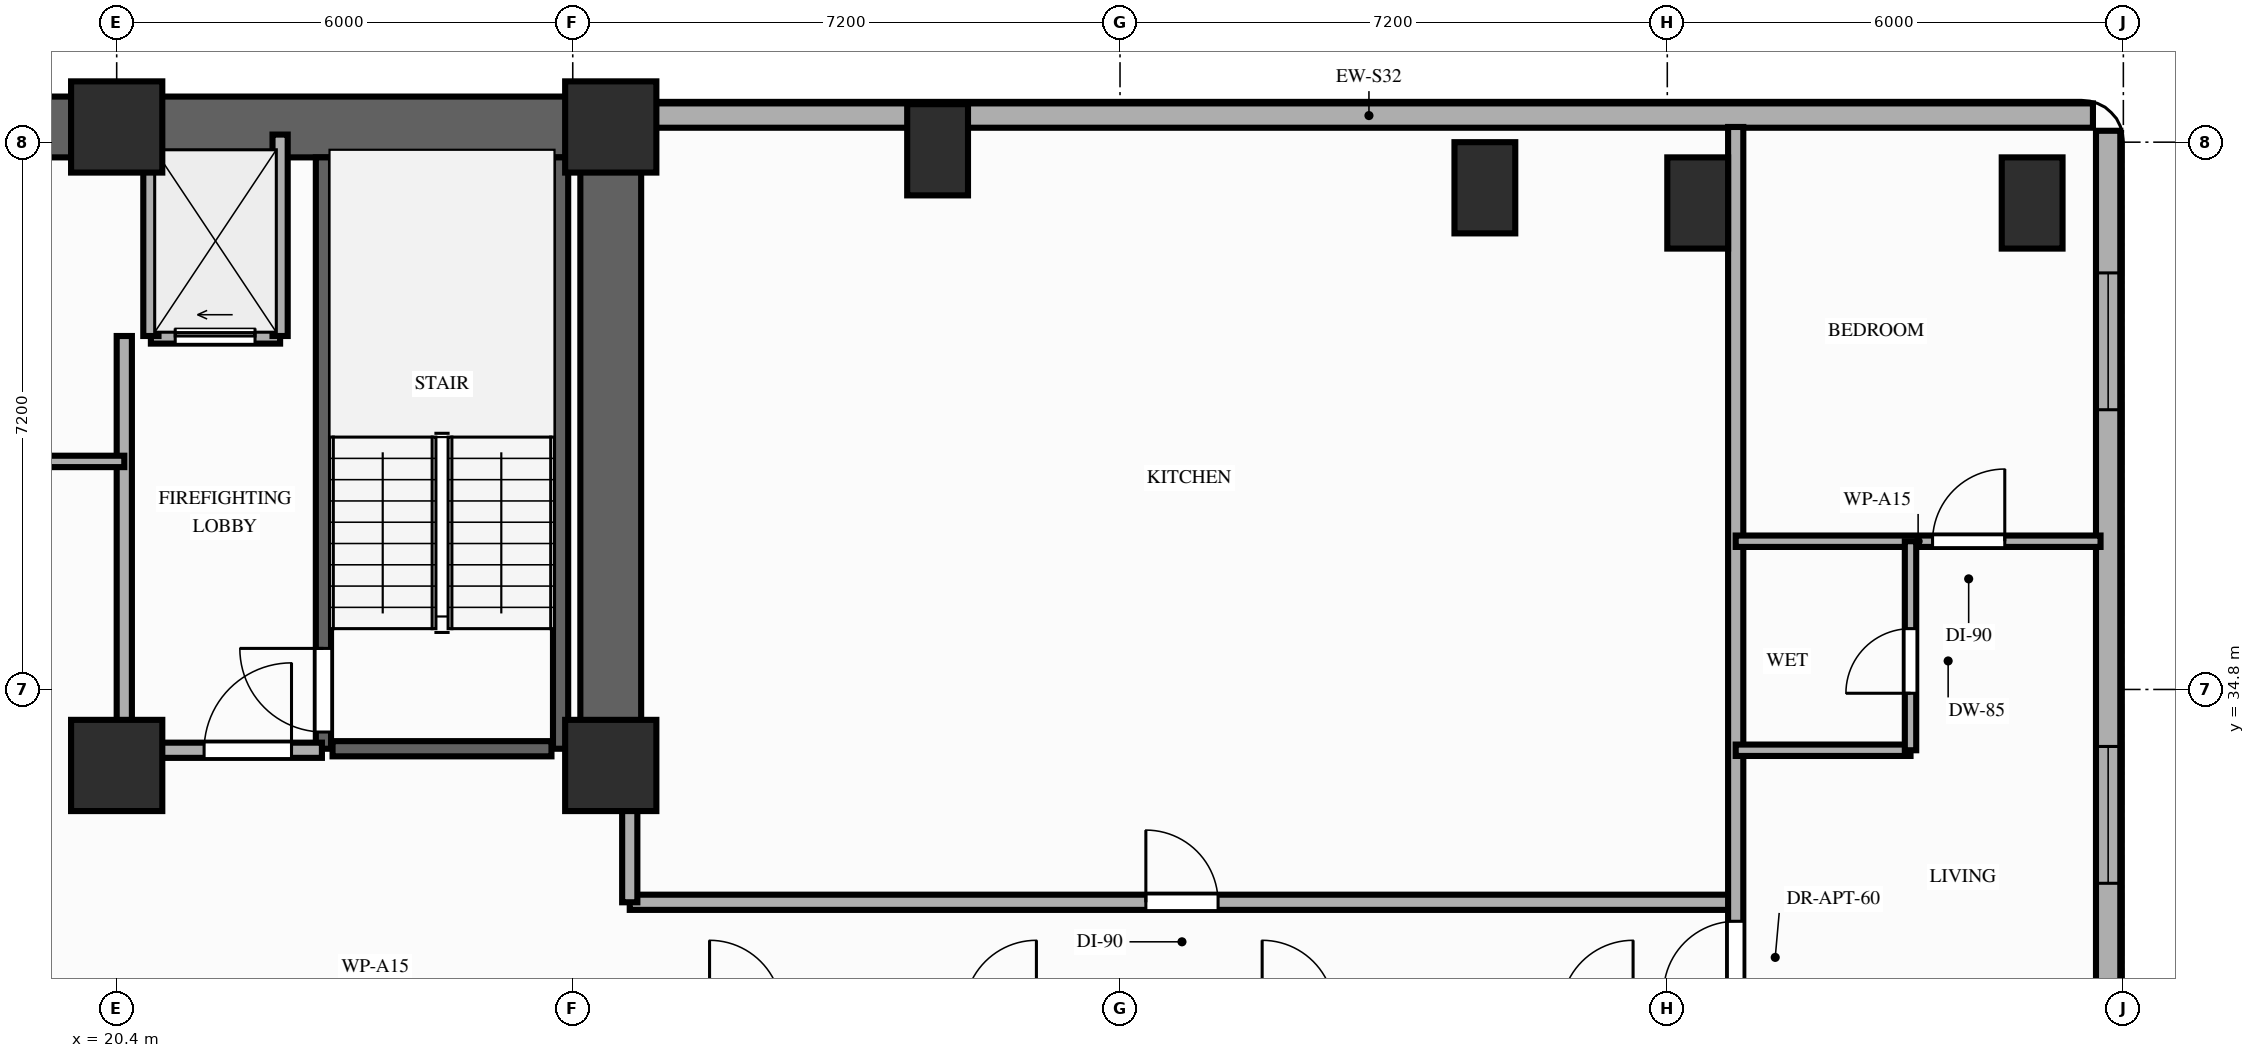
"""IFC4 building model, lengths in metres.
Left out: names, types, materials, properties, quantities, classifications, styles, units other than length and angle.
Written with IfcOpenShell. Run it as: python <this file> out.ifc"""

import sys

from ifc_helpers import new_model, si_unit, direction, frame, frame_2d, origin, origin_2d, place, context, subcontext, project, spatial, rectangle, extrude, element, fill, save


model = new_model("IFC4")
c1 = context("Model", 3, precision=1e-05, world=origin(), true_north=direction((0.0, 1.0)))
c2 = subcontext(c1, "Body", "Model", "MODEL_VIEW")
j1 = project(units=[si_unit("LENGTHUNIT", "METRE"), si_unit("PLANEANGLEUNIT", "RADIAN")], contexts=[c1])
p1 = place(None, origin())
s1 = spatial("IfcSite", under=j1, at=p1, CompositionType="ELEMENT")
p2 = place(p1, origin())
s2 = spatial("IfcBuilding", under=s1, at=p2, CompositionType="ELEMENT")
p3 = place(p2, frame((0.0, 0.0, 99.4)))
s3 = spatial("IfcBuildingStorey", under=s2, at=p3, CompositionType="ELEMENT", Elevation=99.4)
for number, where, z_axis, x_axis in (
    (1, (20.4, 33.8, 0.0), (0.0, 0.0, 1.0), (1.0, 0.0, 0.0)),
    (2, (26.9, 33.8, 0.0), (0.0, 0.0, 1.0), (1.0, 0.0, 0.0)),
    (3, (20.4, 42.2, 0.0), (0.0, 0.0, 1.0), (1.0, 0.0, 0.0)),
    (4, (26.9, 42.2, 0.0), (0.0, 0.0, 1.0), (1.0, 0.0, 0.0)),
):
    element("IfcColumn", number, at=place(p3, frame(where, z_axis=z_axis, x_axis=x_axis)), inside=s3, PredefinedType="COLUMN", context=c2, shape_type="SweptSolid", body=[
        extrude(rectangle(XDim=1.2, YDim=1.2, at=origin_2d()), origin(), (0.0, 0.0, 1.0), 3.2),
    ])
for number, where, z_axis, x_axis in (
    (5, (31.2, 41.9, 0.0), (0.0, 0.0, 1.0), (1.0, 0.0, 0.0)),
    (6, (38.4, 41.4, 0.0), (0.0, 0.0, 1.0), (1.0, 0.0, 0.0)),
    (7, (41.2, 41.2, 0.0), (0.0, 0.0, 1.0), (1.0, 0.0, 0.0)),
    (8, (45.6, 41.2, 0.0), (0.0, 0.0, 1.0), (1.0, 0.0, 0.0)),
):
    element("IfcColumn", number, at=place(p3, frame(where, z_axis=z_axis, x_axis=x_axis)), inside=s3, PredefinedType="COLUMN", context=c2, shape_type="SweptSolid", body=[
        extrude(rectangle(XDim=0.8, YDim=1.2, at=origin_2d()), origin(), (0.0, 0.0, 1.0), 3.2),
    ])
p4 = place(p3, frame((46.4, 42.35, 0.0), z_axis=(0.0, 0.0, 1.0), x_axis=(-1.0, 0.0, 0.0)))
e9 = element("IfcWall", 9, at=p4, inside=s3, PredefinedType="STANDARD", context=c2, shape_type="SweptSolid", body=[
    extrude(rectangle(XDim=19.05, YDim=0.32, at=frame_2d((9.525, 0.0))), origin(), (0.0, 0.0, 1.0), 2.35),
])
p5 = place(p3, frame((46.6, 26.8, 0.0), z_axis=(0.0, 0.0, 1.0), x_axis=(0.0, 1.0, 0.0)))
e10 = element("IfcWall", 10, at=p5, inside=s3, PredefinedType="STANDARD", context=c2, shape_type="SweptSolid", body=[
    extrude(rectangle(XDim=15.35, YDim=0.32, at=frame_2d((7.675, 0.0))), origin(), (0.0, 0.0, 1.0), 2.35),
])
p6 = place(p5, frame((5.45, 0.0, 0.85)))
e11 = element("IfcOpeningElement", 11, at=p6, cuts=e10, PredefinedType="OPENING", context=c2, shape_type="SweptSolid", body=[
    extrude(rectangle(XDim=1.8, YDim=1.25, at=frame_2d((0.9, 0.625))), frame((0.0, 0.17, 0.0), z_axis=(0.0, -1.0, 0.0), x_axis=(1.0, 0.0, 0.0)), (0.0, 0.0, 1.0), 0.34),
])
p7 = place(p5, frame((11.68, 0.0, 0.85)))
e12 = element("IfcOpeningElement", 12, at=p7, cuts=e10, PredefinedType="OPENING", context=c2, shape_type="SweptSolid", body=[
    extrude(rectangle(XDim=1.8, YDim=1.25, at=frame_2d((0.9, 0.625))), frame((0.0, 0.17, 0.0), z_axis=(0.0, -1.0, 0.0), x_axis=(1.0, 0.0, 0.0)), (0.0, 0.0, 1.0), 0.34),
])
p8 = place(p3, frame((6.45, 42.2, 0.0), z_axis=(0.0, 0.0, 1.0), x_axis=(1.0, 0.0, 0.0)))
e13 = element("IfcWall", 13, at=p8, inside=s3, PredefinedType="SHEAR", context=c2, shape_type="SweptSolid", body=[
    extrude(rectangle(XDim=20.45, YDim=0.8, at=frame_2d((10.225, 0.0))), origin(), (0.0, 0.0, 1.0), 2.96),
])
p9 = place(p3, frame((26.9, 33.8, 0.0), z_axis=(0.0, 0.0, 1.0), x_axis=(0.0, 1.0, 0.0)))
e14 = element("IfcWall", 14, at=p9, inside=s3, PredefinedType="SHEAR", context=c2, shape_type="SweptSolid", body=[
    extrude(rectangle(XDim=7.95, YDim=0.8, at=frame_2d((3.975, 0.0))), origin(), (0.0, 0.0, 1.0), 2.96),
])
p10 = place(p3, frame((23.12, 34.02, 0.0), z_axis=(0.0, 0.0, 1.0), x_axis=(0.0, 1.0, 0.0)))
e15 = element("IfcWall", 15, at=p10, inside=s3, PredefinedType="SHEAR", context=c2, shape_type="SweptSolid", body=[
    extrude(rectangle(XDim=7.78, YDim=0.2, at=frame_2d((3.89, 0.0))), origin(), (0.0, 0.0, 1.0), 2.96),
])
p11 = place(p10, frame((0.22, 0.0, 0.0)))
e16 = element("IfcOpeningElement", 16, at=p11, cuts=e15, PredefinedType="OPENING", context=c2, shape_type="SweptSolid", body=[
    extrude(rectangle(XDim=1.1, YDim=2.15, at=frame_2d((0.55, 1.075))), frame((0.0, 0.11, 0.0), z_axis=(0.0, -1.0, 0.0), x_axis=(1.0, 0.0, 0.0)), (0.0, 0.0, 1.0), 0.22),
])
p12 = place(p3, frame((26.24, 34.02, 0.0), z_axis=(0.0, 0.0, 1.0), x_axis=(0.0, 1.0, 0.0)))
e17 = element("IfcWall", 17, at=p12, inside=s3, PredefinedType="SHEAR", context=c2, shape_type="SweptSolid", body=[
    extrude(rectangle(XDim=7.78, YDim=0.2, at=frame_2d((3.89, 0.0))), origin(), (0.0, 0.0, 1.0), 2.96),
])
p13 = place(p3, frame((23.24, 34.02, 0.0), z_axis=(0.0, 0.0, 1.0), x_axis=(1.0, 0.0, 0.0)))
e18 = element("IfcWall", 18, at=p13, inside=s3, PredefinedType="SHEAR", context=c2, shape_type="SweptSolid", body=[
    extrude(rectangle(XDim=2.88, YDim=0.2, at=frame_2d((1.44, 0.0))), origin(), (0.0, 0.0, 1.0), 2.96),
])
p14 = place(p3, frame((20.85, 39.45, 0.0), z_axis=(0.0, 0.0, 1.0), x_axis=(1.0, 0.0, 0.0)))
e19 = element("IfcWall", 19, at=p14, inside=s3, PredefinedType="MOVABLE", context=c2, shape_type="SweptSolid", body=[
    extrude(rectangle(XDim=1.7, YDim=0.2, at=frame_2d((0.85, 0.0))), origin(), (0.0, 0.0, 1.0), 2.96),
])
p15 = place(p14, frame((0.32, 0.0, 0.0)))
e20 = element("IfcOpeningElement", 20, at=p15, cuts=e19, PredefinedType="OPENING", context=c2, shape_type="SweptSolid", body=[
    extrude(rectangle(XDim=1.05, YDim=2.15, at=frame_2d((0.525, 1.075))), frame((0.0, 0.11, 0.0), z_axis=(0.0, -1.0, 0.0), x_axis=(1.0, 0.0, 0.0)), (0.0, 0.0, 1.0), 0.22),
])
for number, where, z_axis, x_axis in (
    (21, (20.85, 39.45, 0.0), (0.0, 0.0, 1.0), (0.0, 1.0, 0.0)),
    (22, (22.55, 39.45, 0.0), (0.0, 0.0, 1.0), (0.0, 1.0, 0.0)),
):
    element("IfcWall", number, at=place(p3, frame(where, z_axis=z_axis, x_axis=x_axis)), inside=s3, PredefinedType="MOVABLE", context=c2, shape_type="SweptSolid", body=[
        extrude(rectangle(XDim=2.65, YDim=0.2, at=frame_2d((1.325, 0.0))), origin(), (0.0, 0.0, 1.0), 2.35),
    ])
p16 = place(p3, frame((20.5, 34.0, 0.0), z_axis=(0.0, 0.0, 1.0), x_axis=(0.0, 1.0, 0.0)))
e23 = element("IfcWall", 23, at=p16, inside=s3, PredefinedType="PARTITIONING", context=c2, shape_type="SweptSolid", body=[
    extrude(rectangle(XDim=5.45, YDim=0.2, at=frame_2d((2.725, 0.0))), origin(), (0.0, 0.0, 1.0), 2.35),
])
p17 = place(p3, frame((20.5, 34.0, 0.0), z_axis=(0.0, 0.0, 1.0), x_axis=(1.0, 0.0, 0.0)))
e24 = element("IfcWall", 24, at=p17, inside=s3, PredefinedType="PARTITIONING", context=c2, shape_type="SweptSolid", body=[
    extrude(rectangle(XDim=2.6, YDim=0.2, at=frame_2d((1.3, 0.0))), origin(), (0.0, 0.0, 1.0), 2.35),
])
p18 = place(p17, frame((1.05, 0.0, 0.0)))
e25 = element("IfcOpeningElement", 25, at=p18, cuts=e24, PredefinedType="OPENING", context=c2, shape_type="SweptSolid", body=[
    extrude(rectangle(XDim=1.15, YDim=2.15, at=frame_2d((0.575, 1.075))), frame((0.0, 0.11, 0.0), z_axis=(0.0, -1.0, 0.0), x_axis=(1.0, 0.0, 0.0)), (0.0, 0.0, 1.0), 0.22),
])
p19 = place(p3, frame((12.9, 37.8, 0.0), z_axis=(0.0, 0.0, 1.0), x_axis=(1.0, 0.0, 0.0)))
e26 = element("IfcWall", 26, at=p19, inside=s3, PredefinedType="PARTITIONING", context=c2, shape_type="SweptSolid", body=[
    extrude(rectangle(XDim=7.6, YDim=0.15, at=frame_2d((3.8, 0.0))), origin(), (0.0, 0.0, 1.0), 2.96),
])
p20 = place(p19, frame((1.3, 0.0, 0.0)))
e27 = element("IfcOpeningElement", 27, at=p20, cuts=e26, PredefinedType="OPENING", context=c2, shape_type="SweptSolid", body=[
    extrude(rectangle(XDim=0.95, YDim=2.15, at=frame_2d((0.475, 1.075))), frame((0.0, 0.085, 0.0), z_axis=(0.0, -1.0, 0.0), x_axis=(1.0, 0.0, 0.0)), (0.0, 0.0, 1.0), 0.17),
])
p21 = place(p19, frame((5.1, 0.0, 0.0)))
e28 = element("IfcOpeningElement", 28, at=p21, cuts=e26, PredefinedType="OPENING", context=c2, shape_type="SweptSolid", body=[
    extrude(rectangle(XDim=0.95, YDim=2.15, at=frame_2d((0.475, 1.075))), frame((0.0, 0.085, 0.0), z_axis=(0.0, -1.0, 0.0), x_axis=(1.0, 0.0, 0.0)), (0.0, 0.0, 1.0), 0.17),
])
p22 = place(p3, frame((27.15, 32.0, 0.0), z_axis=(0.0, 0.0, 1.0), x_axis=(1.0, 0.0, 0.0)))
e29 = element("IfcWall", 29, at=p22, inside=s3, PredefinedType="PARTITIONING", context=c2, shape_type="SweptSolid", body=[
    extrude(rectangle(XDim=14.55, YDim=0.2, at=frame_2d((7.275, 0.0))), origin(), (0.0, 0.0, 1.0), 2.35),
])
p23 = place(p22, frame((6.79, 0.0, 0.0)))
e30 = element("IfcOpeningElement", 30, at=p23, cuts=e29, PredefinedType="OPENING", context=c2, shape_type="SweptSolid", body=[
    extrude(rectangle(XDim=0.95, YDim=2.15, at=frame_2d((0.475, 1.075))), frame((0.0, 0.11, 0.0), z_axis=(0.0, -1.0, 0.0), x_axis=(1.0, 0.0, 0.0)), (0.0, 0.0, 1.0), 0.22),
])
p24 = place(p3, frame((27.15, 32.0, 0.0), z_axis=(0.0, 0.0, 1.0), x_axis=(0.0, 1.0, 0.0)))
e31 = element("IfcWall", 31, at=p24, inside=s3, PredefinedType="PARTITIONING", context=c2, shape_type="SweptSolid", body=[
    extrude(rectangle(XDim=1.68, YDim=0.2, at=frame_2d((0.84, 0.0))), origin(), (0.0, 0.0, 1.0), 2.35),
])
p25 = place(p3, frame((41.7, 26.75, 0.0), z_axis=(0.0, 0.0, 1.0), x_axis=(0.0, 1.0, 0.0)))
e32 = element("IfcWall", 32, at=p25, inside=s3, PredefinedType="PARTITIONING", context=c2, shape_type="SweptSolid", body=[
    extrude(rectangle(XDim=15.45, YDim=0.2, at=frame_2d((7.725, 0.0))), origin(), (0.0, 0.0, 1.0), 2.35),
])
p26 = place(p25, frame((4.05, 0.0, 0.0)))
e33 = element("IfcOpeningElement", 33, at=p26, cuts=e32, PredefinedType="OPENING", context=c2, shape_type="SweptSolid", body=[
    extrude(rectangle(XDim=0.95, YDim=2.15, at=frame_2d((0.475, 1.075))), frame((0.0, 0.11, 0.0), z_axis=(0.0, -1.0, 0.0), x_axis=(1.0, 0.0, 0.0)), (0.0, 0.0, 1.0), 0.22),
])
p27 = place(p3, frame((41.7, 36.75, 0.0), z_axis=(0.0, 0.0, 1.0), x_axis=(1.0, 0.0, 0.0)))
e34 = element("IfcWall", 34, at=p27, inside=s3, PredefinedType="PARTITIONING", context=c2, shape_type="SweptSolid", body=[
    extrude(rectangle(XDim=4.8, YDim=0.15, at=frame_2d((2.4, 0.0))), origin(), (0.0, 0.0, 1.0), 2.35),
])
p28 = place(p27, frame((2.59, 0.0, 0.0)))
e35 = element("IfcOpeningElement", 35, at=p28, cuts=e34, PredefinedType="OPENING", context=c2, shape_type="SweptSolid", body=[
    extrude(rectangle(XDim=0.95, YDim=2.15, at=frame_2d((0.475, 1.075))), frame((0.0, 0.085, 0.0), z_axis=(0.0, -1.0, 0.0), x_axis=(1.0, 0.0, 0.0)), (0.0, 0.0, 1.0), 0.17),
])
p29 = place(p3, frame((41.7, 34.0, 0.0), z_axis=(0.0, 0.0, 1.0), x_axis=(1.0, 0.0, 0.0)))
e36 = element("IfcWall", 36, at=p29, inside=s3, PredefinedType="PARTITIONING", context=c2, shape_type="SweptSolid", body=[
    extrude(rectangle(XDim=2.3, YDim=0.15, at=frame_2d((1.15, 0.0))), origin(), (0.0, 0.0, 1.0), 2.96),
])
p30 = place(p3, frame((44.0, 34.0, 0.0), z_axis=(0.0, 0.0, 1.0), x_axis=(0.0, 1.0, 0.0)))
e37 = element("IfcWall", 37, at=p30, inside=s3, PredefinedType="PARTITIONING", context=c2, shape_type="SweptSolid", body=[
    extrude(rectangle(XDim=2.75, YDim=0.15, at=frame_2d((1.375, 0.0))), origin(), (0.0, 0.0, 1.0), 2.54),
])
p31 = place(p30, frame((0.75, 0.0, 0.0)))
e38 = element("IfcOpeningElement", 38, at=p31, cuts=e37, PredefinedType="OPENING", context=c2, shape_type="SweptSolid", body=[
    extrude(rectangle(XDim=0.85, YDim=2.1, at=frame_2d((0.425, 1.05))), frame((0.0, 0.085, 0.0), z_axis=(0.0, -1.0, 0.0), x_axis=(1.0, 0.0, 0.0)), (0.0, 0.0, 1.0), 0.17),
])
p32 = place(p6, origin())
e39 = element("IfcWindow", 39, at=p32, inside=s3, PartitioningType="SINGLE_PANEL", PredefinedType="WINDOW", context=c2, shape_type="SweptSolid", body=[
    extrude(rectangle(XDim=1.8, YDim=1.25, at=frame_2d((0.9, 0.625))), frame((0.0, 0.03, 0.0), z_axis=(0.0, -1.0, 0.0), x_axis=(1.0, 0.0, 0.0)), (0.0, 0.0, 1.0), 0.06),
])
fill(e11, e39)
p33 = place(p7, origin())
e40 = element("IfcWindow", 40, at=p33, inside=s3, PartitioningType="SINGLE_PANEL", PredefinedType="WINDOW", context=c2, shape_type="SweptSolid", body=[
    extrude(rectangle(XDim=1.8, YDim=1.25, at=frame_2d((0.9, 0.625))), frame((0.0, 0.03, 0.0), z_axis=(0.0, -1.0, 0.0), x_axis=(1.0, 0.0, 0.0)), (0.0, 0.0, 1.0), 0.06),
])
fill(e12, e40)
p34 = place(p11, origin())
e41 = element("IfcDoor", 41, at=p34, inside=s3, OperationType="SINGLE_SWING_RIGHT", PredefinedType="DOOR", context=c2, shape_type="SweptSolid", body=[
    extrude(rectangle(XDim=1.1, YDim=2.15, at=frame_2d((0.55, 1.075))), frame((0.0, 0.025, 0.0), z_axis=(0.0, -1.0, 0.0), x_axis=(1.0, 0.0, 0.0)), (0.0, 0.0, 1.0), 0.05),
])
fill(e16, e41)
p35 = place(p15, origin())
e42 = element("IfcDoor", 42, at=p35, inside=s3, OperationType="SLIDING_TO_LEFT", PredefinedType="DOOR", context=c2, shape_type="SweptSolid", body=[
    extrude(rectangle(XDim=1.05, YDim=2.15, at=frame_2d((0.525, 1.075))), frame((0.0, 0.025, 0.0), z_axis=(0.0, -1.0, 0.0), x_axis=(1.0, 0.0, 0.0)), (0.0, 0.0, 1.0), 0.05),
])
fill(e20, e42)
p36 = place(p18, origin())
e43 = element("IfcDoor", 43, at=p36, inside=s3, OperationType="SINGLE_SWING_RIGHT", PredefinedType="DOOR", context=c2, shape_type="SweptSolid", body=[
    extrude(rectangle(XDim=1.15, YDim=2.15, at=frame_2d((0.575, 1.075))), frame((0.0, 0.025, 0.0), z_axis=(0.0, -1.0, 0.0), x_axis=(1.0, 0.0, 0.0)), (0.0, 0.0, 1.0), 0.05),
])
fill(e25, e43)
p37 = place(p26, origin())
e44 = element("IfcDoor", 44, at=p37, inside=s3, OperationType="SINGLE_SWING_LEFT", PredefinedType="DOOR", context=c2, shape_type="SweptSolid", body=[
    extrude(rectangle(XDim=0.95, YDim=2.15, at=frame_2d((0.475, 1.075))), frame((0.0, 0.025, 0.0), z_axis=(0.0, -1.0, 0.0), x_axis=(1.0, 0.0, 0.0)), (0.0, 0.0, 1.0), 0.05),
])
fill(e33, e44)
p38 = place(p28, origin())
e45 = element("IfcDoor", 45, at=p38, inside=s3, OperationType="SINGLE_SWING_RIGHT", PredefinedType="DOOR", context=c2, shape_type="SweptSolid", body=[
    extrude(rectangle(XDim=0.95, YDim=2.15, at=frame_2d((0.475, 1.075))), frame((0.0, 0.025, 0.0), z_axis=(0.0, -1.0, 0.0), x_axis=(1.0, 0.0, 0.0)), (0.0, 0.0, 1.0), 0.05),
])
fill(e35, e45)
p39 = place(p31, origin())
e46 = element("IfcDoor", 46, at=p39, inside=s3, OperationType="SINGLE_SWING_LEFT", PredefinedType="DOOR", context=c2, shape_type="SweptSolid", body=[
    extrude(rectangle(XDim=0.85, YDim=2.1, at=frame_2d((0.425, 1.05))), frame((0.0, 0.025, 0.0), z_axis=(0.0, -1.0, 0.0), x_axis=(1.0, 0.0, 0.0)), (0.0, 0.0, 1.0), 0.05),
])
fill(e38, e46)
p40 = place(p23, origin())
e47 = element("IfcDoor", 47, at=p40, inside=s3, OperationType="SINGLE_SWING_LEFT", PredefinedType="DOOR", context=c2, shape_type="SweptSolid", body=[
    extrude(rectangle(XDim=0.95, YDim=2.15, at=frame_2d((0.475, 1.075))), frame((0.0, 0.025, 0.0), z_axis=(0.0, -1.0, 0.0), x_axis=(1.0, 0.0, 0.0)), (0.0, 0.0, 1.0), 0.05),
])
fill(e30, e47)
save(model, sys.argv[1])
